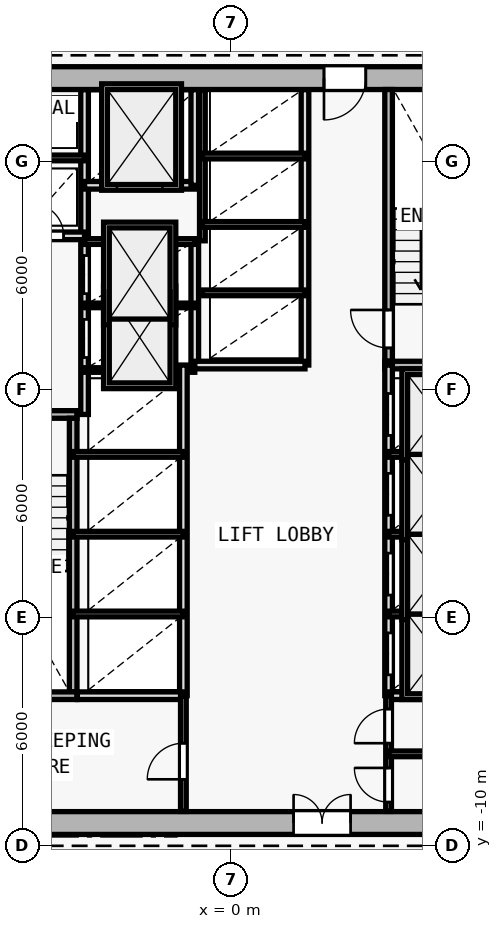
"""IFC4 building model, lengths in metres.
Left out: names, types, materials, properties, quantities, classifications, styles, units other than length and angle.
Written with IfcOpenShell. Run it as: python <this file> out.ifc"""

import sys

from ifc_helpers import new_model, si_unit, direction, frame, frame_2d, origin, origin_2d, place, context, subcontext, project, spatial, rectangle, i_section, extrude, element, fill, save


model = new_model("IFC4")
c1 = context("Model", 3, precision=1e-05, world=origin(), true_north=direction((0.0, 1.0)))
c2 = subcontext(c1, "Body", "Model", "MODEL_VIEW")
j1 = project(units=[si_unit("LENGTHUNIT", "METRE"), si_unit("PLANEANGLEUNIT", "RADIAN")], contexts=[c1])
p1 = place(None, origin())
s1 = spatial("IfcSite", under=j1, at=p1, CompositionType="ELEMENT")
p2 = place(p1, origin())
s2 = spatial("IfcBuilding", under=s1, at=p2, CompositionType="ELEMENT")
p3 = place(p2, frame((0.0, 0.0, 51.6)))
s3 = spatial("IfcBuildingStorey", under=s2, at=p3, CompositionType="ELEMENT", Elevation=51.6)
p4 = place(p3, frame((0.0, -9.4, 0.0), z_axis=(0.0, 0.0, 1.0), x_axis=(1.0, 0.0, 0.0)))
e1 = element("IfcColumn", 1, at=p4, inside=s3, PredefinedType="COLUMN", context=c2, shape_type="SweptSolid", body=[
    extrude(i_section(OverallWidth=0.416, OverallDepth=0.446, WebThickness=0.025, FlangeThickness=0.04, FilletRadius=0.015, at=origin_2d()), origin(), (0.0, 0.0, 1.0), 3.6),
])
p5 = place(p3, frame((-8.0, -9.4, 0.0), z_axis=(0.0, 0.0, 1.0), x_axis=(1.0, 0.0, 0.0)))
e2 = element("IfcWall", 2, at=p5, inside=s3, PredefinedType="SHEAR", context=c2, shape_type="SweptSolid", body=[
    extrude(rectangle(XDim=16.0, YDim=0.6, at=frame_2d((8.0, 0.0))), origin(), (0.0, 0.0, 1.0), 3.35),
])
p6 = place(p5, frame((9.65, 0.0, 0.0)))
e3 = element("IfcOpeningElement", 3, at=p6, cuts=e2, PredefinedType="OPENING", context=c2, shape_type="SweptSolid", body=[
    extrude(rectangle(XDim=1.5, YDim=2.2, at=frame_2d((0.75, 1.1))), frame((0.0, 0.31, 0.0), z_axis=(0.0, -1.0, 0.0), x_axis=(1.0, 0.0, 0.0)), (0.0, 0.0, 1.0), 0.62),
])
p7 = place(p3, frame((8.0, 10.2, 0.0), z_axis=(0.0, 0.0, 1.0), x_axis=(-1.0, 0.0, 0.0)))
e4 = element("IfcWall", 4, at=p7, inside=s3, PredefinedType="SHEAR", context=c2, shape_type="SweptSolid", body=[
    extrude(rectangle(XDim=16.0, YDim=0.6, at=frame_2d((8.0, 0.0))), origin(), (0.0, 0.0, 1.0), 3.35),
])
p8 = place(p7, frame((4.45, 0.0, 0.0)))
e5 = element("IfcOpeningElement", 5, at=p8, cuts=e4, PredefinedType="OPENING", context=c2, shape_type="SweptSolid", body=[
    extrude(rectangle(XDim=1.1, YDim=2.15, at=frame_2d((0.55, 1.075))), frame((0.0, 0.31, 0.0), z_axis=(0.0, -1.0, 0.0), x_axis=(1.0, 0.0, 0.0)), (0.0, 0.0, 1.0), 0.62),
])
p9 = place(p3, frame((-7.4, 1.35, 0.0), z_axis=(0.0, 0.0, 1.0), x_axis=(1.0, 0.0, 0.0)))
e6 = element("IfcWall", 6, at=p9, inside=s3, PredefinedType="SOLIDWALL", context=c2, shape_type="SweptSolid", body=[
    extrude(rectangle(XDim=3.35, YDim=0.2, at=frame_2d((1.675, 0.0))), origin(), (0.0, 0.0, 1.0), 3.35),
])
p10 = place(p9, frame((0.65, 0.0, 0.0)))
e7 = element("IfcOpeningElement", 7, at=p10, cuts=e6, PredefinedType="OPENING", context=c2, shape_type="SweptSolid", body=[
    extrude(rectangle(XDim=1.0, YDim=2.15, at=frame_2d((0.5, 1.075))), frame((0.0, 0.11, 0.0), z_axis=(0.0, -1.0, 0.0), x_axis=(1.0, 0.0, 0.0)), (0.0, 0.0, 1.0), 0.22),
])
p11 = place(p3, frame((-4.15, -5.95, 0.0), z_axis=(0.0, 0.0, 1.0), x_axis=(0.0, 1.0, 0.0)))
e8 = element("IfcWall", 8, at=p11, inside=s3, PredefinedType="SOLIDWALL", context=c2, shape_type="SweptSolid", body=[
    extrude(rectangle(XDim=7.2, YDim=0.2, at=frame_2d((3.6, 0.0))), origin(), (0.0, 0.0, 1.0), 3.35),
])
p12 = place(p3, frame((-3.85, 1.35, 0.0), z_axis=(0.0, 0.0, 1.0), x_axis=(0.0, 1.0, 0.0)))
e9 = element("IfcWall", 9, at=p12, inside=s3, PredefinedType="SOLIDWALL", context=c2, shape_type="SweptSolid", body=[
    extrude(rectangle(XDim=8.545, YDim=0.2, at=frame_2d((4.272, 0.0))), origin(), (0.0, 0.0, 1.0), 3.35),
])
p13 = place(p12, frame((1.5, 0.0, 0.0)))
e10 = element("IfcOpeningElement", 10, at=p13, cuts=e9, PredefinedType="OPENING", context=c2, shape_type="SweptSolid", body=[
    extrude(rectangle(XDim=1.0, YDim=2.15, at=frame_2d((0.5, 1.075))), frame((0.0, 0.11, 0.0), z_axis=(0.0, -1.0, 0.0), x_axis=(1.0, 0.0, 0.0)), (0.0, 0.0, 1.0), 0.22),
])
p14 = place(p12, frame((3.18, 0.0, 0.0)))
e11 = element("IfcOpeningElement", 11, at=p14, cuts=e9, PredefinedType="OPENING", context=c2, shape_type="SweptSolid", body=[
    extrude(rectangle(XDim=1.0, YDim=2.15, at=frame_2d((0.5, 1.075))), frame((0.0, 0.11, 0.0), z_axis=(0.0, -1.0, 0.0), x_axis=(1.0, 0.0, 0.0)), (0.0, 0.0, 1.0), 0.22),
])
p15 = place(p3, frame((-7.395, 6.05, 0.0), z_axis=(0.0, 0.0, 1.0), x_axis=(1.0, 0.0, 0.0)))
e12 = element("IfcWall", 12, at=p15, inside=s3, PredefinedType="SOLIDWALL", context=c2, shape_type="SweptSolid", body=[
    extrude(rectangle(XDim=3.545, YDim=0.2, at=frame_2d((1.772, 0.0))), origin(), (0.0, 0.0, 1.0), 3.35),
])
p16 = place(p15, frame((0.345, 0.0, 0.0)))
e13 = element("IfcOpeningElement", 13, at=p16, cuts=e12, PredefinedType="OPENING", context=c2, shape_type="SweptSolid", body=[
    extrude(rectangle(XDim=0.85, YDim=2.1, at=frame_2d((0.425, 1.05))), frame((0.0, 0.11, 0.0), z_axis=(0.0, -1.0, 0.0), x_axis=(1.0, 0.0, 0.0)), (0.0, 0.0, 1.0), 0.22),
])
p17 = place(p15, frame((2.145, 0.0, 0.0)))
e14 = element("IfcOpeningElement", 14, at=p17, cuts=e12, PredefinedType="OPENING", context=c2, shape_type="SweptSolid", body=[
    extrude(rectangle(XDim=0.85, YDim=2.1, at=frame_2d((0.425, 1.05))), frame((0.0, 0.11, 0.0), z_axis=(0.0, -1.0, 0.0), x_axis=(1.0, 0.0, 0.0)), (0.0, 0.0, 1.0), 0.22),
])
p18 = place(p3, frame((-7.395, 8.1, 0.0), z_axis=(0.0, 0.0, 1.0), x_axis=(1.0, 0.0, 0.0)))
e15 = element("IfcWall", 15, at=p18, inside=s3, PredefinedType="PARTITIONING", context=c2, shape_type="SweptSolid", body=[
    extrude(rectangle(XDim=3.545, YDim=0.15, at=frame_2d((1.772, 0.0))), origin(), (0.0, 0.0, 1.0), 3.35),
])
p19 = place(p3, frame((4.15, 2.75, 0.0), z_axis=(0.0, 0.0, 1.0), x_axis=(0.0, 1.0, 0.0)))
e16 = element("IfcWall", 16, at=p19, inside=s3, PredefinedType="SOLIDWALL", context=c2, shape_type="SweptSolid", body=[
    extrude(rectangle(XDim=7.15, YDim=0.2, at=frame_2d((3.575, 0.0))), origin(), (0.0, 0.0, 1.0), 3.35),
])
p20 = place(p19, frame((0.35, 0.0, 0.0)))
e17 = element("IfcOpeningElement", 17, at=p20, cuts=e16, PredefinedType="OPENING", context=c2, shape_type="SweptSolid", body=[
    extrude(rectangle(XDim=1.0, YDim=2.15, at=frame_2d((0.5, 1.075))), frame((0.0, 0.11, 0.0), z_axis=(0.0, -1.0, 0.0), x_axis=(1.0, 0.0, 0.0)), (0.0, 0.0, 1.0), 0.22),
])
p21 = place(p3, frame((4.05, 2.65, 0.0), z_axis=(0.0, 0.0, 1.0), x_axis=(1.0, 0.0, 0.0)))
e18 = element("IfcWall", 18, at=p21, inside=s3, PredefinedType="SOLIDWALL", context=c2, shape_type="SweptSolid", body=[
    extrude(rectangle(XDim=3.35, YDim=0.2, at=frame_2d((1.675, 0.0))), origin(), (0.0, 0.0, 1.0), 3.35),
])
p22 = place(p3, frame((-0.95, 2.65, 0.0), z_axis=(0.0, 0.0, 1.0), x_axis=(0.0, 1.0, 0.0)))
e19 = element("IfcWall", 19, at=p22, inside=s3, PredefinedType="SOLIDWALL", context=c2, shape_type="SweptSolid", body=[
    extrude(rectangle(XDim=3.27, YDim=0.2, at=frame_2d((1.635, 0.0))), origin(), (0.0, 0.0, 1.0), 3.35),
])
for number, where, z_axis, x_axis in (
    (20, (-3.85, 2.52, 0.0), (0.0, 0.0, 1.0), (1.0, 0.0, 0.0)),
    (21, (-3.85, 4.22, 0.0), (0.0, 0.0, 1.0), (1.0, 0.0, 0.0)),
):
    element("IfcWall", number, at=place(p3, frame(where, z_axis=z_axis, x_axis=x_axis)), inside=s3, PredefinedType="PARTITIONING", context=c2, shape_type="SweptSolid", body=[
        extrude(rectangle(XDim=2.9, YDim=0.12, at=frame_2d((1.45, 0.0))), origin(), (0.0, 0.0, 1.0), 3.35),
    ])
p23 = place(p3, frame((-3.85, 5.9, 0.0), z_axis=(0.0, 0.0, 1.0), x_axis=(1.0, 0.0, 0.0)))
e22 = element("IfcWall", 22, at=p23, inside=s3, PredefinedType="PARTITIONING", context=c2, shape_type="SweptSolid", body=[
    extrude(rectangle(XDim=2.9, YDim=0.15, at=frame_2d((1.45, 0.0))), origin(), (0.0, 0.0, 1.0), 3.35),
])
p24 = place(p3, frame((-3.85, 7.38, 0.0), z_axis=(0.0, 0.0, 1.0), x_axis=(1.0, 0.0, 0.0)))
e23 = element("IfcWall", 23, at=p24, inside=s3, PredefinedType="SOLIDWALL", context=c2, shape_type="SweptSolid", body=[
    extrude(rectangle(XDim=2.9, YDim=0.2, at=frame_2d((1.45, 0.0))), origin(), (0.0, 0.0, 1.0), 3.35),
])
p25 = place(p24, frame((0.85, 0.0, 0.0)))
e24 = element("IfcOpeningElement", 24, at=p25, cuts=e23, PredefinedType="OPENING", context=c2, shape_type="SweptSolid", body=[
    extrude(rectangle(XDim=1.2, YDim=2.2, at=frame_2d((0.6, 1.1))), frame((0.0, 0.11, 0.0), z_axis=(0.0, -1.0, 0.0), x_axis=(1.0, 0.0, 0.0)), (0.0, 0.0, 1.0), 0.22),
])
p26 = place(p3, frame((-0.95, 7.38, 0.0), z_axis=(0.0, 0.0, 1.0), x_axis=(0.0, 1.0, 0.0)))
e25 = element("IfcWall", 25, at=p26, inside=s3, PredefinedType="SOLIDWALL", context=c2, shape_type="SweptSolid", body=[
    extrude(rectangle(XDim=2.515, YDim=0.2, at=frame_2d((1.258, 0.0))), origin(), (0.0, 0.0, 1.0), 3.35),
])
p27 = place(p3, frame((4.15, -6.05, 0.0), z_axis=(0.0, 0.0, 1.0), x_axis=(0.0, 1.0, 0.0)))
e26 = element("IfcWall", 26, at=p27, inside=s3, PredefinedType="SOLIDWALL", context=c2, shape_type="SweptSolid", body=[
    extrude(rectangle(XDim=8.7, YDim=0.2, at=frame_2d((4.35, 0.0))), origin(), (0.0, 0.0, 1.0), 3.35),
])
p28 = place(p27, frame((0.55, 0.0, 0.0)))
e27 = element("IfcOpeningElement", 27, at=p28, cuts=e26, PredefinedType="OPENING", context=c2, shape_type="SweptSolid", body=[
    extrude(rectangle(XDim=1.1, YDim=2.15, at=frame_2d((0.55, 1.075))), frame((0.0, 0.11, 0.0), z_axis=(0.0, -1.0, 0.0), x_axis=(1.0, 0.0, 0.0)), (0.0, 0.0, 1.0), 0.22),
])
p29 = place(p27, frame((2.65, 0.0, 0.0)))
e28 = element("IfcOpeningElement", 28, at=p29, cuts=e26, PredefinedType="OPENING", context=c2, shape_type="SweptSolid", body=[
    extrude(rectangle(XDim=1.1, YDim=2.15, at=frame_2d((0.55, 1.075))), frame((0.0, 0.11, 0.0), z_axis=(0.0, -1.0, 0.0), x_axis=(1.0, 0.0, 0.0)), (0.0, 0.0, 1.0), 0.22),
])
p30 = place(p27, frame((4.75, 0.0, 0.0)))
e29 = element("IfcOpeningElement", 29, at=p30, cuts=e26, PredefinedType="OPENING", context=c2, shape_type="SweptSolid", body=[
    extrude(rectangle(XDim=1.1, YDim=2.15, at=frame_2d((0.55, 1.075))), frame((0.0, 0.11, 0.0), z_axis=(0.0, -1.0, 0.0), x_axis=(1.0, 0.0, 0.0)), (0.0, 0.0, 1.0), 0.22),
])
p31 = place(p27, frame((6.85, 0.0, 0.0)))
e30 = element("IfcOpeningElement", 30, at=p31, cuts=e26, PredefinedType="OPENING", context=c2, shape_type="SweptSolid", body=[
    extrude(rectangle(XDim=1.1, YDim=2.15, at=frame_2d((0.55, 1.075))), frame((0.0, 0.11, 0.0), z_axis=(0.0, -1.0, 0.0), x_axis=(1.0, 0.0, 0.0)), (0.0, 0.0, 1.0), 0.22),
])
for number, where, z_axis, x_axis in (
    (31, (4.15, -3.9, 0.0), (0.0, 0.0, 1.0), (1.0, 0.0, 0.0)),
    (32, (4.15, -1.8, 0.0), (0.0, 0.0, 1.0), (1.0, 0.0, 0.0)),
    (33, (4.15, 0.3, 0.0), (0.0, 0.0, 1.0), (1.0, 0.0, 0.0)),
):
    element("IfcWall", number, at=place(p3, frame(where, z_axis=z_axis, x_axis=x_axis)), inside=s3, PredefinedType="PARTITIONING", context=c2, shape_type="SweptSolid", body=[
        extrude(rectangle(XDim=2.6, YDim=0.15, at=frame_2d((1.3, 0.0))), origin(), (0.0, 0.0, 1.0), 3.35),
    ])
p32 = place(p3, frame((-1.25, -6.05, 0.0), z_axis=(0.0, 0.0, 1.0), x_axis=(0.0, 1.0, 0.0)))
e34 = element("IfcWall", 34, at=p32, inside=s3, PredefinedType="SOLIDWALL", context=c2, shape_type="SweptSolid", body=[
    extrude(rectangle(XDim=8.7, YDim=0.2, at=frame_2d((4.35, 0.0))), origin(), (0.0, 0.0, 1.0), 3.35),
])
for number, where, z_axis, x_axis in (
    (35, (-4.15, -3.9, 0.0), (0.0, 0.0, 1.0), (1.0, 0.0, 0.0)),
    (36, (-4.15, -1.8, 0.0), (0.0, 0.0, 1.0), (1.0, 0.0, 0.0)),
    (37, (-4.15, 0.3, 0.0), (0.0, 0.0, 1.0), (1.0, 0.0, 0.0)),
):
    element("IfcWall", number, at=place(p3, frame(where, z_axis=z_axis, x_axis=x_axis)), inside=s3, PredefinedType="PARTITIONING", context=c2, shape_type="SweptSolid", body=[
        extrude(rectangle(XDim=2.9, YDim=0.15, at=frame_2d((1.45, 0.0))), origin(), (0.0, 0.0, 1.0), 3.35),
    ])
p33 = place(p3, frame((1.95, 2.65, 0.0), z_axis=(0.0, 0.0, 1.0), x_axis=(0.0, 1.0, 0.0)))
e38 = element("IfcWall", 38, at=p33, inside=s3, PredefinedType="SOLIDWALL", context=c2, shape_type="SweptSolid", body=[
    extrude(rectangle(XDim=7.245, YDim=0.2, at=frame_2d((3.623, 0.0))), origin(), (0.0, 0.0, 1.0), 3.35),
])
p34 = place(p3, frame((-0.95, 2.65, 0.0), z_axis=(0.0, 0.0, 1.0), x_axis=(1.0, 0.0, 0.0)))
e39 = element("IfcWall", 39, at=p34, inside=s3, PredefinedType="SOLIDWALL", context=c2, shape_type="SweptSolid", body=[
    extrude(rectangle(XDim=2.9, YDim=0.2, at=frame_2d((1.45, 0.0))), origin(), (0.0, 0.0, 1.0), 3.35),
])
p35 = place(p3, frame((-0.75, 5.92, 0.0), z_axis=(0.0, 0.0, 1.0), x_axis=(0.0, 1.0, 0.0)))
e40 = element("IfcWall", 40, at=p35, inside=s3, PredefinedType="PARTITIONING", context=c2, shape_type="SweptSolid", body=[
    extrude(rectangle(XDim=3.975, YDim=0.15, at=frame_2d((1.988, 0.0))), origin(), (0.0, 0.0, 1.0), 3.35),
])
for number, where, z_axis, x_axis in (
    (41, (-0.75, 4.55, 0.0), (0.0, 0.0, 1.0), (1.0, 0.0, 0.0)),
    (42, (-0.75, 6.35, 0.0), (0.0, 0.0, 1.0), (1.0, 0.0, 0.0)),
    (43, (-0.75, 8.15, 0.0), (0.0, 0.0, 1.0), (1.0, 0.0, 0.0)),
):
    element("IfcWall", number, at=place(p3, frame(where, z_axis=z_axis, x_axis=x_axis)), inside=s3, PredefinedType="PARTITIONING", context=c2, shape_type="SweptSolid", body=[
        extrude(rectangle(XDim=2.7, YDim=0.15, at=frame_2d((1.35, 0.0))), origin(), (0.0, 0.0, 1.0), 3.35),
    ])
p36 = place(p3, frame((-7.4, -6.05, 0.0), z_axis=(0.0, 0.0, 1.0), x_axis=(1.0, 0.0, 0.0)))
e44 = element("IfcWall", 44, at=p36, inside=s3, PredefinedType="SOLIDWALL", context=c2, shape_type="SweptSolid", body=[
    extrude(rectangle(XDim=3.35, YDim=0.2, at=frame_2d((1.675, 0.0))), origin(), (0.0, 0.0, 1.0), 3.35),
])
p37 = place(p3, frame((-4.04, -6.05, 0.0), z_axis=(0.0, 0.0, 1.0), x_axis=(1.0, 0.0, 0.0)))
e45 = element("IfcWall", 45, at=p37, inside=s3, PredefinedType="SOLIDWALL", context=c2, shape_type="SweptSolid", body=[
    extrude(rectangle(XDim=2.79, YDim=0.2, at=frame_2d((1.395, 0.0))), origin(), (0.0, 0.0, 1.0), 3.35),
])
p38 = place(p3, frame((4.15, -6.05, 0.0), z_axis=(0.0, 0.0, 1.0), x_axis=(1.0, 0.0, 0.0)))
e46 = element("IfcWall", 46, at=p38, inside=s3, PredefinedType="SOLIDWALL", context=c2, shape_type="SweptSolid", body=[
    extrude(rectangle(XDim=3.245, YDim=0.2, at=frame_2d((1.623, 0.0))), origin(), (0.0, 0.0, 1.0), 3.35),
])
p39 = place(p3, frame((-1.25, -9.095, 0.0), z_axis=(0.0, 0.0, 1.0), x_axis=(0.0, 1.0, 0.0)))
e47 = element("IfcWall", 47, at=p39, inside=s3, PredefinedType="PARTITIONING", context=c2, shape_type="SweptSolid", body=[
    extrude(rectangle(XDim=3.045, YDim=0.15, at=frame_2d((1.522, 0.0))), origin(), (0.0, 0.0, 1.0), 3.35),
])
p40 = place(p39, frame((0.845, 0.0, 0.0)))
e48 = element("IfcOpeningElement", 48, at=p40, cuts=e47, PredefinedType="OPENING", context=c2, shape_type="SweptSolid", body=[
    extrude(rectangle(XDim=0.95, YDim=2.1, at=frame_2d((0.475, 1.05))), frame((0.0, 0.085, 0.0), z_axis=(0.0, -1.0, 0.0), x_axis=(1.0, 0.0, 0.0)), (0.0, 0.0, 1.0), 0.17),
])
p41 = place(p3, frame((4.15, -9.095, 0.0), z_axis=(0.0, 0.0, 1.0), x_axis=(0.0, 1.0, 0.0)))
e49 = element("IfcWall", 49, at=p41, inside=s3, PredefinedType="PARTITIONING", context=c2, shape_type="SweptSolid", body=[
    extrude(rectangle(XDim=3.045, YDim=0.15, at=frame_2d((1.522, 0.0))), origin(), (0.0, 0.0, 1.0), 3.35),
])
p42 = place(p41, frame((0.245, 0.0, 0.0)))
e50 = element("IfcOpeningElement", 50, at=p42, cuts=e49, PredefinedType="OPENING", context=c2, shape_type="SweptSolid", body=[
    extrude(rectangle(XDim=0.9, YDim=2.1, at=frame_2d((0.45, 1.05))), frame((0.0, 0.085, 0.0), z_axis=(0.0, -1.0, 0.0), x_axis=(1.0, 0.0, 0.0)), (0.0, 0.0, 1.0), 0.17),
])
p43 = place(p41, frame((1.795, 0.0, 0.0)))
e51 = element("IfcOpeningElement", 51, at=p43, cuts=e49, PredefinedType="OPENING", context=c2, shape_type="SweptSolid", body=[
    extrude(rectangle(XDim=0.9, YDim=2.1, at=frame_2d((0.45, 1.05))), frame((0.0, 0.085, 0.0), z_axis=(0.0, -1.0, 0.0), x_axis=(1.0, 0.0, 0.0)), (0.0, 0.0, 1.0), 0.17),
])
p44 = place(p3, frame((4.15, -7.58, 0.0), z_axis=(0.0, 0.0, 1.0), x_axis=(1.0, 0.0, 0.0)))
e52 = element("IfcWall", 52, at=p44, inside=s3, PredefinedType="PARTITIONING", context=c2, shape_type="SweptSolid", body=[
    extrude(rectangle(XDim=3.245, YDim=0.15, at=frame_2d((1.623, 0.0))), origin(), (0.0, 0.0, 1.0), 3.35),
])
p45 = place(p6, origin())
e53 = element("IfcDoor", 53, at=p45, inside=s3, OperationType="DOUBLE_DOOR_SINGLE_SWING", PredefinedType="DOOR", context=c2, shape_type="SweptSolid", body=[
    extrude(rectangle(XDim=1.5, YDim=2.2, at=frame_2d((0.75, 1.1))), frame((0.0, 0.025, 0.0), z_axis=(0.0, -1.0, 0.0), x_axis=(1.0, 0.0, 0.0)), (0.0, 0.0, 1.0), 0.05),
])
fill(e3, e53)
p46 = place(p8, origin())
e54 = element("IfcDoor", 54, at=p46, inside=s3, OperationType="SINGLE_SWING_RIGHT", PredefinedType="DOOR", context=c2, shape_type="SweptSolid", body=[
    extrude(rectangle(XDim=1.1, YDim=2.15, at=frame_2d((0.55, 1.075))), frame((0.0, 0.025, 0.0), z_axis=(0.0, -1.0, 0.0), x_axis=(1.0, 0.0, 0.0)), (0.0, 0.0, 1.0), 0.05),
])
fill(e5, e54)
p47 = place(p17, origin())
e55 = element("IfcDoor", 55, at=p47, inside=s3, OperationType="SINGLE_SWING_LEFT", PredefinedType="DOOR", context=c2, shape_type="SweptSolid", body=[
    extrude(rectangle(XDim=0.85, YDim=2.1, at=frame_2d((0.425, 1.05))), frame((0.0, 0.025, 0.0), z_axis=(0.0, -1.0, 0.0), x_axis=(1.0, 0.0, 0.0)), (0.0, 0.0, 1.0), 0.05),
])
fill(e14, e55)
p48 = place(p20, origin())
e56 = element("IfcDoor", 56, at=p48, inside=s3, OperationType="SINGLE_SWING_RIGHT", PredefinedType="DOOR", context=c2, shape_type="SweptSolid", body=[
    extrude(rectangle(XDim=1.0, YDim=2.15, at=frame_2d((0.5, 1.075))), frame((0.0, 0.025, 0.0), z_axis=(0.0, -1.0, 0.0), x_axis=(1.0, 0.0, 0.0)), (0.0, 0.0, 1.0), 0.05),
])
fill(e17, e56)
p49 = place(p25, origin())
e57 = element("IfcDoor", 57, at=p49, inside=s3, OperationType="DOUBLE_DOOR_SLIDING", PredefinedType="DOOR", context=c2, shape_type="SweptSolid", body=[
    extrude(rectangle(XDim=1.2, YDim=2.2, at=frame_2d((0.6, 1.1))), frame((0.0, 0.025, 0.0), z_axis=(0.0, -1.0, 0.0), x_axis=(1.0, 0.0, 0.0)), (0.0, 0.0, 1.0), 0.05),
])
fill(e24, e57)
p50 = place(p28, origin())
e58 = element("IfcDoor", 58, at=p50, inside=s3, OperationType="DOUBLE_DOOR_SLIDING", PredefinedType="DOOR", context=c2, shape_type="SweptSolid", body=[
    extrude(rectangle(XDim=1.1, YDim=2.15, at=frame_2d((0.55, 1.075))), frame((0.0, 0.025, 0.0), z_axis=(0.0, -1.0, 0.0), x_axis=(1.0, 0.0, 0.0)), (0.0, 0.0, 1.0), 0.05),
])
fill(e27, e58)
p51 = place(p29, origin())
e59 = element("IfcDoor", 59, at=p51, inside=s3, OperationType="DOUBLE_DOOR_SLIDING", PredefinedType="DOOR", context=c2, shape_type="SweptSolid", body=[
    extrude(rectangle(XDim=1.1, YDim=2.15, at=frame_2d((0.55, 1.075))), frame((0.0, 0.025, 0.0), z_axis=(0.0, -1.0, 0.0), x_axis=(1.0, 0.0, 0.0)), (0.0, 0.0, 1.0), 0.05),
])
fill(e28, e59)
p52 = place(p30, origin())
e60 = element("IfcDoor", 60, at=p52, inside=s3, OperationType="DOUBLE_DOOR_SLIDING", PredefinedType="DOOR", context=c2, shape_type="SweptSolid", body=[
    extrude(rectangle(XDim=1.1, YDim=2.15, at=frame_2d((0.55, 1.075))), frame((0.0, 0.025, 0.0), z_axis=(0.0, -1.0, 0.0), x_axis=(1.0, 0.0, 0.0)), (0.0, 0.0, 1.0), 0.05),
])
fill(e29, e60)
p53 = place(p31, origin())
e61 = element("IfcDoor", 61, at=p53, inside=s3, OperationType="DOUBLE_DOOR_SLIDING", PredefinedType="DOOR", context=c2, shape_type="SweptSolid", body=[
    extrude(rectangle(XDim=1.1, YDim=2.15, at=frame_2d((0.55, 1.075))), frame((0.0, 0.025, 0.0), z_axis=(0.0, -1.0, 0.0), x_axis=(1.0, 0.0, 0.0)), (0.0, 0.0, 1.0), 0.05),
])
fill(e30, e61)
p54 = place(p13, origin())
e62 = element("IfcDoor", 62, at=p54, inside=s3, OperationType="DOUBLE_DOOR_SLIDING", PredefinedType="DOOR", context=c2, shape_type="SweptSolid", body=[
    extrude(rectangle(XDim=1.0, YDim=2.15, at=frame_2d((0.5, 1.075))), frame((0.0, 0.025, 0.0), z_axis=(0.0, -1.0, 0.0), x_axis=(1.0, 0.0, 0.0)), (0.0, 0.0, 1.0), 0.05),
])
fill(e10, e62)
p55 = place(p14, origin())
e63 = element("IfcDoor", 63, at=p55, inside=s3, OperationType="DOUBLE_DOOR_SLIDING", PredefinedType="DOOR", context=c2, shape_type="SweptSolid", body=[
    extrude(rectangle(XDim=1.0, YDim=2.15, at=frame_2d((0.5, 1.075))), frame((0.0, 0.025, 0.0), z_axis=(0.0, -1.0, 0.0), x_axis=(1.0, 0.0, 0.0)), (0.0, 0.0, 1.0), 0.05),
])
fill(e11, e63)
p56 = place(p40, origin())
e64 = element("IfcDoor", 64, at=p56, inside=s3, OperationType="SINGLE_SWING_LEFT", PredefinedType="DOOR", context=c2, shape_type="SweptSolid", body=[
    extrude(rectangle(XDim=0.95, YDim=2.1, at=frame_2d((0.475, 1.05))), frame((0.0, 0.025, 0.0), z_axis=(0.0, -1.0, 0.0), x_axis=(1.0, 0.0, 0.0)), (0.0, 0.0, 1.0), 0.05),
])
fill(e48, e64)
p57 = place(p42, origin())
e65 = element("IfcDoor", 65, at=p57, inside=s3, OperationType="SINGLE_SWING_RIGHT", PredefinedType="DOOR", context=c2, shape_type="SweptSolid", body=[
    extrude(rectangle(XDim=0.9, YDim=2.1, at=frame_2d((0.45, 1.05))), frame((0.0, 0.025, 0.0), z_axis=(0.0, -1.0, 0.0), x_axis=(1.0, 0.0, 0.0)), (0.0, 0.0, 1.0), 0.05),
])
fill(e50, e65)
p58 = place(p43, origin())
e66 = element("IfcDoor", 66, at=p58, inside=s3, OperationType="SINGLE_SWING_LEFT", PredefinedType="DOOR", context=c2, shape_type="SweptSolid", body=[
    extrude(rectangle(XDim=0.9, YDim=2.1, at=frame_2d((0.45, 1.05))), frame((0.0, 0.025, 0.0), z_axis=(0.0, -1.0, 0.0), x_axis=(1.0, 0.0, 0.0)), (0.0, 0.0, 1.0), 0.05),
])
fill(e51, e66)
save(model, sys.argv[1])
